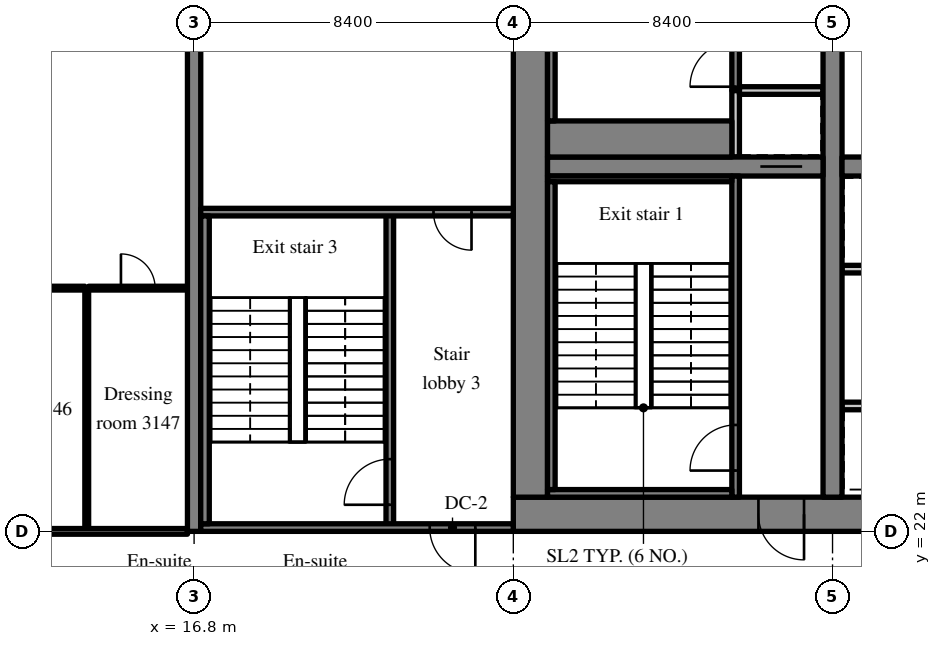
"""IFC4 building model, lengths in metres.
Left out: names, types, materials, properties, quantities, classifications, styles, units other than length and angle.
Written with IfcOpenShell. Run it as: python <this file> out.ifc"""

import sys

from ifc_helpers import new_model, si_unit, direction, frame, frame_2d, origin, place, context, subcontext, project, spatial, rectangle, extrude, source, transform, mapped, element, fill, save


model = new_model("IFC4")
c1 = context("Model", 3, precision=1e-05, world=origin(), true_north=direction((0.0, 1.0)))
c2 = subcontext(c1, "Body", "Model", "MODEL_VIEW")
j1 = project(units=[si_unit("LENGTHUNIT", "METRE"), si_unit("PLANEANGLEUNIT", "RADIAN")], contexts=[c1])
p1 = place(None, origin())
s1 = spatial("IfcSite", under=j1, at=p1, CompositionType="ELEMENT")
p2 = place(p1, origin())
s2 = spatial("IfcBuilding", under=s1, at=p2, CompositionType="ELEMENT")
p3 = place(p2, frame((0.0, 0.0, 129.4)))
s3 = spatial("IfcBuildingStorey", under=s2, at=p3, CompositionType="ELEMENT", Elevation=129.4)
m1 = source(origin(), c2, "Body", "SweptSolid", [
    extrude(rectangle(XDim=50.4, YDim=0.9, at=frame_2d((25.2, 0.0))), origin(), (0.0, 0.0, 1.0), 3.52),
])
p4 = place(p3, frame((25.2, 22.45, 0.0), z_axis=(0.0, 0.0, 1.0), x_axis=(1.0, 0.0, 0.0)))
e1 = element("IfcWall", 1, at=p4, inside=s3, PredefinedType="SHEAR", context=c2, shape_type="MappedRepresentation", body=[
    mapped(m1, transform((0.0, 0.0, 0.0), scale=1.0)),
])
m2 = source(origin(), c2, "Body", "SweptSolid", [
    extrude(rectangle(XDim=1.8, YDim=2.1, at=frame_2d((0.9, 1.05))), frame((0.0, 0.46, 0.0), z_axis=(0.0, -1.0, 0.0), x_axis=(1.0, 0.0, 0.0)), (0.0, 0.0, 1.0), 0.92),
])
p5 = place(p4, frame((15.9, 0.0, 0.0)))
e2 = element("IfcOpeningElement", 2, at=p5, cuts=e1, PredefinedType="OPENING", context=c2, shape_type="MappedRepresentation", body=[
    mapped(m2, transform((0.0, 0.0, 0.0), scale=1.0)),
])
m3 = source(origin(), c2, "Body", "SweptSolid", [
    extrude(rectangle(XDim=1.2, YDim=2.1, at=frame_2d((0.6, 1.05))), frame((0.0, 0.46, 0.0), z_axis=(0.0, -1.0, 0.0), x_axis=(1.0, 0.0, 0.0)), (0.0, 0.0, 1.0), 0.92),
])
p6 = place(p4, frame((26.975, 0.0, 0.0)))
e3 = element("IfcOpeningElement", 3, at=p6, cuts=e1, PredefinedType="OPENING", context=c2, shape_type="MappedRepresentation", body=[
    mapped(m3, transform((0.0, 0.0, 0.0), scale=1.0)),
])
m4 = source(origin(), c2, "Body", "SweptSolid", [
    extrude(rectangle(XDim=0.9, YDim=2.1, at=frame_2d((0.45, 1.05))), frame((0.0, 0.46, 0.0), z_axis=(0.0, -1.0, 0.0), x_axis=(1.0, 0.0, 0.0)), (0.0, 0.0, 1.0), 0.92),
])
p7 = place(p4, frame((33.75, 0.0, 0.0)))
e4 = element("IfcOpeningElement", 4, at=p7, cuts=e1, PredefinedType="OPENING", context=c2, shape_type="MappedRepresentation", body=[
    mapped(m4, transform((0.0, 0.0, 0.0), scale=1.0)),
])
p8 = place(p4, frame((30.75, 0.0, 0.0)))
e5 = element("IfcOpeningElement", 5, at=p8, cuts=e1, PredefinedType="OPENING", context=c2, shape_type="MappedRepresentation", body=[
    mapped(m4, transform((0.0, 0.0, 0.0), scale=1.0)),
])
p9 = place(p4, frame((38.275, 0.0, 0.0)))
e6 = element("IfcOpeningElement", 6, at=p9, cuts=e1, PredefinedType="OPENING", context=c2, shape_type="MappedRepresentation", body=[
    mapped(m4, transform((0.0, 0.0, 0.0), scale=1.0)),
])
p10 = place(p4, frame((6.45, 0.0, 0.0)))
e7 = element("IfcOpeningElement", 7, at=p10, cuts=e1, PredefinedType="OPENING", context=c2, shape_type="MappedRepresentation", body=[
    mapped(m3, transform((0.0, 0.0, 0.0), scale=1.0)),
])
p11 = place(p4, frame((47.775, 0.0, 0.0)))
e8 = element("IfcOpeningElement", 8, at=p11, cuts=e1, PredefinedType="OPENING", context=c2, shape_type="MappedRepresentation", body=[
    mapped(m3, transform((0.0, 0.0, 0.0), scale=1.0)),
])
m5 = source(origin(), c2, "Body", "SweptSolid", [
    extrude(rectangle(XDim=18.2, YDim=0.9, at=frame_2d((9.1, 0.0))), origin(), (0.0, 0.0, 1.0), 3.52),
])
p12 = place(p3, frame((25.65, 22.9, 0.0), z_axis=(0.0, 0.0, 1.0), x_axis=(0.0, 1.0, 0.0)))
e9 = element("IfcWall", 9, at=p12, inside=s3, PredefinedType="SHEAR", context=c2, shape_type="MappedRepresentation", body=[
    mapped(m5, transform((0.0, 0.0, 0.0), scale=1.0)),
])
m6 = source(origin(), c2, "Body", "SweptSolid", [
    extrude(rectangle(XDim=18.2, YDim=0.5, at=frame_2d((9.1, 0.0))), origin(), (0.0, 0.0, 1.0), 3.52),
])
p13 = place(p3, frame((33.6, 22.9, 0.0), z_axis=(0.0, 0.0, 1.0), x_axis=(0.0, 1.0, 0.0)))
e10 = element("IfcWall", 10, at=p13, inside=s3, PredefinedType="SHEAR", context=c2, shape_type="MappedRepresentation", body=[
    mapped(m6, transform((0.0, 0.0, 0.0), scale=1.0)),
])
m7 = source(origin(), c2, "Body", "SweptSolid", [
    extrude(rectangle(XDim=1.1, YDim=2.1, at=frame_2d((0.55, 1.05))), frame((0.0, 0.26, 0.0), z_axis=(0.0, -1.0, 0.0), x_axis=(1.0, 0.0, 0.0)), (0.0, 0.0, 1.0), 0.52),
])
p14 = place(p13, frame((12.55, 0.0, 0.0)))
e11 = element("IfcOpeningElement", 11, at=p14, cuts=e10, PredefinedType="OPENING", context=c2, shape_type="MappedRepresentation", body=[
    mapped(m7, transform((0.0, 0.0, 0.0), scale=1.0)),
])
m8 = source(origin(), c2, "Body", "SweptSolid", [
    extrude(rectangle(XDim=7.25, YDim=0.5, at=frame_2d((3.625, 0.0))), origin(), (0.0, 0.0, 1.0), 3.52),
])
p15 = place(p3, frame((26.1, 31.6, 0.0), z_axis=(0.0, 0.0, 1.0), x_axis=(1.0, 0.0, 0.0)))
e12 = element("IfcWall", 12, at=p15, inside=s3, PredefinedType="SHEAR", context=c2, shape_type="MappedRepresentation", body=[
    mapped(m8, transform((0.0, 0.0, 0.0), scale=1.0)),
])
p16 = place(p15, frame((5.6, 0.0, 0.0)))
e13 = element("IfcOpeningElement", 13, at=p16, cuts=e12, PredefinedType="OPENING", context=c2, shape_type="MappedRepresentation", body=[
    mapped(m7, transform((0.0, 0.0, 0.0), scale=1.0)),
])
m9 = source(origin(), c2, "Body", "SweptSolid", [
    extrude(rectangle(XDim=16.3, YDim=0.5, at=frame_2d((8.15, 0.0))), origin(), (0.0, 0.0, 1.0), 3.52),
])
p17 = place(p3, frame((33.85, 31.6, 0.0), z_axis=(0.0, 0.0, 1.0), x_axis=(1.0, 0.0, 0.0)))
e14 = element("IfcWall", 14, at=p17, inside=s3, PredefinedType="SHEAR", context=c2, shape_type="MappedRepresentation", body=[
    mapped(m9, transform((0.0, 0.0, 0.0), scale=1.0)),
])
m10 = source(origin(), c2, "Body", "SweptSolid", [
    extrude(rectangle(XDim=1.0, YDim=2.1, at=frame_2d((0.5, 1.05))), frame((0.0, 0.26, 0.0), z_axis=(0.0, -1.0, 0.0), x_axis=(1.0, 0.0, 0.0)), (0.0, 0.0, 1.0), 0.52),
])
p18 = place(p17, frame((14.725, 0.0, 0.0)))
e15 = element("IfcOpeningElement", 15, at=p18, cuts=e14, PredefinedType="OPENING", context=c2, shape_type="MappedRepresentation", body=[
    mapped(m10, transform((0.0, 0.0, 0.0), scale=1.0)),
])
m11 = source(origin(), c2, "Body", "SweptSolid", [
    extrude(rectangle(XDim=20.0, YDim=0.35, at=frame_2d((10.0, 0.0))), origin(), (0.0, 0.0, 1.0), 3.52),
])
p19 = place(p3, frame((16.8, 22.0, 0.0), z_axis=(0.0, 0.0, 1.0), x_axis=(0.0, 1.0, 0.0)))
e16 = element("IfcWall", 16, at=p19, inside=s3, PredefinedType="SHEAR", context=c2, shape_type="MappedRepresentation", body=[
    mapped(m11, transform((0.0, 0.0, 0.0), scale=1.0)),
])
m12 = source(origin(), c2, "Body", "SweptSolid", [
    extrude(rectangle(XDim=6.05, YDim=0.2, at=frame_2d((3.025, 0.0))), origin(), (0.0, 0.0, 1.0), 3.52),
])
p20 = place(p3, frame((33.85, 25.3, 0.0), z_axis=(0.0, 0.0, 1.0), x_axis=(1.0, 0.0, 0.0)))
e17 = element("IfcWall", 17, at=p20, inside=s3, PredefinedType="SOLIDWALL", context=c2, shape_type="MappedRepresentation", body=[
    mapped(m12, transform((0.0, 0.0, 0.0), scale=1.0)),
])
m13 = source(origin(), c2, "Body", "SweptSolid", [
    extrude(rectangle(XDim=1.1, YDim=2.1, at=frame_2d((0.55, 1.05))), frame((0.0, 0.11, 0.0), z_axis=(0.0, -1.0, 0.0), x_axis=(1.0, 0.0, 0.0)), (0.0, 0.0, 1.0), 0.22),
])
p21 = place(p20, frame((1.0, 0.0, 0.0)))
e18 = element("IfcOpeningElement", 18, at=p21, cuts=e17, PredefinedType="OPENING", context=c2, shape_type="MappedRepresentation", body=[
    mapped(m13, transform((0.0, 0.0, 0.0), scale=1.0)),
])
p22 = place(p20, frame((4.0, 0.0, 0.0)))
e19 = element("IfcOpeningElement", 19, at=p22, cuts=e17, PredefinedType="OPENING", context=c2, shape_type="MappedRepresentation", body=[
    mapped(m13, transform((0.0, 0.0, 0.0), scale=1.0)),
])
m14 = source(origin(), c2, "Body", "SweptSolid", [
    extrude(rectangle(XDim=12.05, YDim=0.2, at=frame_2d((6.025, 0.0))), origin(), (0.0, 0.0, 1.0), 3.52),
])
p23 = place(p3, frame((33.85, 28.9, 0.0), z_axis=(0.0, 0.0, 1.0), x_axis=(1.0, 0.0, 0.0)))
e20 = element("IfcWall", 20, at=p23, inside=s3, PredefinedType="SOLIDWALL", context=c2, shape_type="MappedRepresentation", body=[
    mapped(m14, transform((0.0, 0.0, 0.0), scale=1.0)),
])
p24 = place(p23, frame((1.0, 0.0, 0.0)))
e21 = element("IfcOpeningElement", 21, at=p24, cuts=e20, PredefinedType="OPENING", context=c2, shape_type="MappedRepresentation", body=[
    mapped(m13, transform((0.0, 0.0, 0.0), scale=1.0)),
])
p25 = place(p23, frame((4.0, 0.0, 0.0)))
e22 = element("IfcOpeningElement", 22, at=p25, cuts=e20, PredefinedType="OPENING", context=c2, shape_type="MappedRepresentation", body=[
    mapped(m13, transform((0.0, 0.0, 0.0), scale=1.0)),
])
p26 = place(p23, frame((7.0, 0.0, 0.0)))
e23 = element("IfcOpeningElement", 23, at=p26, cuts=e20, PredefinedType="OPENING", context=c2, shape_type="MappedRepresentation", body=[
    mapped(m13, transform((0.0, 0.0, 0.0), scale=1.0)),
])
p27 = place(p23, frame((10.0, 0.0, 0.0)))
e24 = element("IfcOpeningElement", 24, at=p27, cuts=e20, PredefinedType="OPENING", context=c2, shape_type="MappedRepresentation", body=[
    mapped(m13, transform((0.0, 0.0, 0.0), scale=1.0)),
])
m15 = source(origin(), c2, "Body", "SweptSolid", [
    extrude(rectangle(XDim=8.45, YDim=0.2, at=frame_2d((4.225, 0.0))), origin(), (0.0, 0.0, 1.0), 3.52),
])
p28 = place(p3, frame((31.05, 22.9, 0.0), z_axis=(0.0, 0.0, 1.0), x_axis=(0.0, 1.0, 0.0)))
e25 = element("IfcWall", 25, at=p28, inside=s3, PredefinedType="SOLIDWALL", context=c2, shape_type="MappedRepresentation", body=[
    mapped(m15, transform((0.0, 0.0, 0.0), scale=1.0)),
])
m16 = source(origin(), c2, "Body", "SweptSolid", [
    extrude(rectangle(XDim=1.2, YDim=2.1, at=frame_2d((0.6, 1.05))), frame((0.0, 0.11, 0.0), z_axis=(0.0, -1.0, 0.0), x_axis=(1.0, 0.0, 0.0)), (0.0, 0.0, 1.0), 0.22),
])
p29 = place(p28, frame((0.7, 0.0, 0.0)))
e26 = element("IfcOpeningElement", 26, at=p29, cuts=e25, PredefinedType="OPENING", context=c2, shape_type="MappedRepresentation", body=[
    mapped(m16, transform((0.0, 0.0, 0.0), scale=1.0)),
])
m17 = source(origin(), c2, "Body", "SweptSolid", [
    extrude(rectangle(XDim=1.75, YDim=0.2, at=frame_2d((0.875, 0.0))), origin(), (0.0, 0.0, 1.0), 3.52),
])
p30 = place(p3, frame((31.05, 31.85, 0.0), z_axis=(0.0, 0.0, 1.0), x_axis=(0.0, 1.0, 0.0)))
e27 = element("IfcWall", 27, at=p30, inside=s3, PredefinedType="SOLIDWALL", context=c2, shape_type="MappedRepresentation", body=[
    mapped(m17, transform((0.0, 0.0, 0.0), scale=1.0)),
])
m18 = source(origin(), c2, "Body", "SweptSolid", [
    extrude(rectangle(XDim=2.2, YDim=0.2, at=frame_2d((1.1, 0.0))), origin(), (0.0, 0.0, 1.0), 3.52),
])
p31 = place(p3, frame((31.15, 33.6, 0.0), z_axis=(0.0, 0.0, 1.0), x_axis=(1.0, 0.0, 0.0)))
e28 = element("IfcWall", 28, at=p31, inside=s3, PredefinedType="SOLIDWALL", context=c2, shape_type="MappedRepresentation", body=[
    mapped(m18, transform((0.0, 0.0, 0.0), scale=1.0)),
])
m19 = source(origin(), c2, "Body", "SweptSolid", [
    extrude(rectangle(XDim=7.5, YDim=0.2, at=frame_2d((3.75, 0.0))), origin(), (0.0, 0.0, 1.0), 3.52),
])
p32 = place(p3, frame((31.05, 33.6, 0.0), z_axis=(0.0, 0.0, 1.0), x_axis=(0.0, 1.0, 0.0)))
e29 = element("IfcWall", 29, at=p32, inside=s3, PredefinedType="SOLIDWALL", context=c2, shape_type="MappedRepresentation", body=[
    mapped(m19, transform((0.0, 0.0, 0.0), scale=1.0)),
])
p33 = place(p32, frame((0.1, 0.0, 0.0)))
e30 = element("IfcOpeningElement", 30, at=p33, cuts=e29, PredefinedType="OPENING", context=c2, shape_type="MappedRepresentation", body=[
    mapped(m16, transform((0.0, 0.0, 0.0), scale=1.0)),
])
m20 = source(origin(), c2, "Body", "SweptSolid", [
    extrude(rectangle(XDim=8.3, YDim=0.2, at=frame_2d((4.15, 0.0))), origin(), (0.0, 0.0, 1.0), 3.52),
])
p34 = place(p3, frame((21.95, 22.1, 0.0), z_axis=(0.0, 0.0, 1.0), x_axis=(0.0, 1.0, 0.0)))
e31 = element("IfcWall", 31, at=p34, inside=s3, PredefinedType="SOLIDWALL", context=c2, shape_type="MappedRepresentation", body=[
    mapped(m20, transform((0.0, 0.0, 0.0), scale=1.0)),
])
p35 = place(p34, frame((0.6, 0.0, 0.0)))
e32 = element("IfcOpeningElement", 32, at=p35, cuts=e31, PredefinedType="OPENING", context=c2, shape_type="MappedRepresentation", body=[
    mapped(m16, transform((0.0, 0.0, 0.0), scale=1.0)),
])
m21 = source(origin(), c2, "Body", "SweptSolid", [
    extrude(rectangle(XDim=8.225, YDim=0.2, at=frame_2d((4.112, 0.0))), origin(), (0.0, 0.0, 1.0), 3.52),
])
p36 = place(p3, frame((16.975, 22.1, 0.0), z_axis=(0.0, 0.0, 1.0), x_axis=(1.0, 0.0, 0.0)))
e33 = element("IfcWall", 33, at=p36, inside=s3, PredefinedType="SOLIDWALL", context=c2, shape_type="MappedRepresentation", body=[
    mapped(m21, transform((0.0, 0.0, 0.0), scale=1.0)),
])
p37 = place(p36, frame((6.025, 0.0, 0.0)))
e34 = element("IfcOpeningElement", 34, at=p37, cuts=e33, PredefinedType="OPENING", context=c2, shape_type="MappedRepresentation", body=[
    mapped(m16, transform((0.0, 0.0, 0.0), scale=1.0)),
])
p38 = place(p3, frame((16.975, 30.4, 0.0), z_axis=(0.0, 0.0, 1.0), x_axis=(1.0, 0.0, 0.0)))
e35 = element("IfcWall", 35, at=p38, inside=s3, PredefinedType="SOLIDWALL", context=c2, shape_type="MappedRepresentation", body=[
    mapped(m21, transform((0.0, 0.0, 0.0), scale=1.0)),
])
m22 = source(origin(), c2, "Body", "SweptSolid", [
    extrude(rectangle(XDim=1.0, YDim=2.1, at=frame_2d((0.5, 1.05))), frame((0.0, 0.11, 0.0), z_axis=(0.0, -1.0, 0.0), x_axis=(1.0, 0.0, 0.0)), (0.0, 0.0, 1.0), 0.22),
])
p39 = place(p38, frame((6.125, 0.0, 0.0)))
e36 = element("IfcOpeningElement", 36, at=p39, cuts=e35, PredefinedType="OPENING", context=c2, shape_type="MappedRepresentation", body=[
    mapped(m22, transform((0.0, 0.0, 0.0), scale=1.0)),
])
m23 = source(origin(), c2, "Body", "SweptSolid", [
    extrude(rectangle(XDim=4.85, YDim=0.2, at=frame_2d((2.425, 0.0))), origin(), (0.0, 0.0, 1.0), 3.52),
])
p40 = place(p3, frame((26.1, 23.0, 0.0), z_axis=(0.0, 0.0, 1.0), x_axis=(1.0, 0.0, 0.0)))
e37 = element("IfcWall", 37, at=p40, inside=s3, PredefinedType="SOLIDWALL", context=c2, shape_type="MappedRepresentation", body=[
    mapped(m23, transform((0.0, 0.0, 0.0), scale=1.0)),
])
m24 = source(origin(), c2, "Body", "SweptSolid", [
    extrude(rectangle(XDim=4.85, YDim=0.15, at=frame_2d((2.425, 0.0))), origin(), (0.0, 0.0, 1.0), 3.52),
])
p41 = place(p3, frame((26.1, 31.275, 0.0), z_axis=(0.0, 0.0, 1.0), x_axis=(1.0, 0.0, 0.0)))
e38 = element("IfcWall", 38, at=p41, inside=s3, PredefinedType="SOLIDWALL", context=c2, shape_type="MappedRepresentation", body=[
    mapped(m24, transform((0.0, 0.0, 0.0), scale=1.0)),
])
m25 = source(origin(), c2, "Body", "SweptSolid", [
    extrude(rectangle(XDim=8.1, YDim=0.2, at=frame_2d((4.05, 0.0))), origin(), (0.0, 0.0, 1.0), 3.52),
])
p42 = place(p3, frame((26.2, 23.1, 0.0), z_axis=(0.0, 0.0, 1.0), x_axis=(0.0, 1.0, 0.0)))
e39 = element("IfcWall", 39, at=p42, inside=s3, PredefinedType="SOLIDWALL", context=c2, shape_type="MappedRepresentation", body=[
    mapped(m25, transform((0.0, 0.0, 0.0), scale=1.0)),
])
m26 = source(origin(), c2, "Body", "SweptSolid", [
    extrude(rectangle(XDim=8.1, YDim=0.225, at=frame_2d((4.05, 0.0))), origin(), (0.0, 0.0, 1.0), 3.52),
])
p43 = place(p3, frame((17.087, 22.2, 0.0), z_axis=(0.0, 0.0, 1.0), x_axis=(0.0, 1.0, 0.0)))
e40 = element("IfcWall", 40, at=p43, inside=s3, PredefinedType="SOLIDWALL", context=c2, shape_type="MappedRepresentation", body=[
    mapped(m26, transform((0.0, 0.0, 0.0), scale=1.0)),
])
m27 = source(origin(), c2, "Body", "SweptSolid", [
    extrude(rectangle(XDim=4.85, YDim=0.95, at=frame_2d((2.425, 0.0))), origin(), (0.0, 0.0, 1.0), 3.52),
])
p44 = place(p3, frame((26.1, 32.325, 0.0), z_axis=(0.0, 0.0, 1.0), x_axis=(1.0, 0.0, 0.0)))
e41 = element("IfcWall", 41, at=p44, inside=s3, PredefinedType="SOLIDWALL", context=c2, shape_type="MappedRepresentation", body=[
    mapped(m27, transform((0.0, 0.0, 0.0), scale=1.0)),
])
p45 = place(p3, frame((26.2, 32.8, 0.0), z_axis=(0.0, 0.0, 1.0), x_axis=(0.0, 1.0, 0.0)))
e42 = element("IfcWall", 42, at=p45, inside=s3, PredefinedType="SOLIDWALL", context=c2, shape_type="MappedRepresentation", body=[
    mapped(m25, transform((0.0, 0.0, 0.0), scale=1.0)),
])
m28 = source(origin(), c2, "Body", "SweptSolid", [
    extrude(rectangle(XDim=6.25, YDim=0.1, at=frame_2d((3.125, 0.0))), origin(), (0.0, 0.0, 1.0), 3.52),
])
p46 = place(p3, frame((13.975, 22.075, 0.0), z_axis=(0.0, 0.0, 1.0), x_axis=(0.0, 1.0, 0.0)))
e43 = element("IfcWall", 43, at=p46, inside=s3, PredefinedType="PARTITIONING", context=c2, shape_type="MappedRepresentation", body=[
    mapped(m28, transform((0.0, 0.0, 0.0), scale=1.0)),
])
m29 = source(origin(), c2, "Body", "SweptSolid", [
    extrude(rectangle(XDim=3.5, YDim=0.1, at=frame_2d((1.75, 0.0))), origin(), (0.0, 0.0, 1.0), 3.52),
])
p47 = place(p3, frame((10.425, 28.4, 0.0), z_axis=(0.0, 0.0, 1.0), x_axis=(1.0, 0.0, 0.0)))
e44 = element("IfcWall", 44, at=p47, inside=s3, PredefinedType="PARTITIONING", context=c2, shape_type="MappedRepresentation", body=[
    mapped(m29, transform((0.0, 0.0, 0.0), scale=1.0)),
])
m30 = source(origin(), c2, "Body", "SweptSolid", [
    extrude(rectangle(XDim=0.9, YDim=2.1, at=frame_2d((0.45, 1.05))), frame((0.0, 0.06, 0.0), z_axis=(0.0, -1.0, 0.0), x_axis=(1.0, 0.0, 0.0)), (0.0, 0.0, 1.0), 0.12),
])
p48 = place(p47, frame((1.3, 0.0, 0.0)))
e45 = element("IfcOpeningElement", 45, at=p48, cuts=e44, PredefinedType="OPENING", context=c2, shape_type="MappedRepresentation", body=[
    mapped(m30, transform((0.0, 0.0, 0.0), scale=1.0)),
])
m31 = source(origin(), c2, "Body", "SweptSolid", [
    extrude(rectangle(XDim=2.6, YDim=0.1, at=frame_2d((1.3, 0.0))), origin(), (0.0, 0.0, 1.0), 3.52),
])
p49 = place(p3, frame((14.025, 28.4, 0.0), z_axis=(0.0, 0.0, 1.0), x_axis=(1.0, 0.0, 0.0)))
e46 = element("IfcWall", 46, at=p49, inside=s3, PredefinedType="PARTITIONING", context=c2, shape_type="MappedRepresentation", body=[
    mapped(m31, transform((0.0, 0.0, 0.0), scale=1.0)),
])
p50 = place(p49, frame((0.85, 0.0, 0.0)))
e47 = element("IfcOpeningElement", 47, at=p50, cuts=e46, PredefinedType="OPENING", context=c2, shape_type="MappedRepresentation", body=[
    mapped(m30, transform((0.0, 0.0, 0.0), scale=1.0)),
])
m32 = source(origin(), c2, "Body", "SweptSolid", [
    extrude(rectangle(XDim=8.05, YDim=0.15, at=frame_2d((4.025, 0.0))), origin(), (0.0, 0.0, 1.0), 2.82),
])
p51 = place(p3, frame((8.575, 22.0, 0.0), z_axis=(0.0, 0.0, 1.0), x_axis=(1.0, 0.0, 0.0)))
e48 = element("IfcWall", 48, at=p51, inside=s3, PredefinedType="PARTITIONING", context=c2, shape_type="MappedRepresentation", body=[
    mapped(m32, transform((0.0, 0.0, 0.0), scale=1.0)),
])
m33 = source(origin(), c2, "Body", "SweptSolid", [
    extrude(rectangle(XDim=1.0, YDim=2.1, at=frame_2d((0.5, 1.05))), frame((0.0, 0.085, 0.0), z_axis=(0.0, -1.0, 0.0), x_axis=(1.0, 0.0, 0.0)), (0.0, 0.0, 1.0), 0.17),
])
p52 = place(p51, frame((0.4, 0.0, 0.0)))
e49 = element("IfcOpeningElement", 49, at=p52, cuts=e48, PredefinedType="OPENING", context=c2, shape_type="MappedRepresentation", body=[
    mapped(m33, transform((0.0, 0.0, 0.0), scale=1.0)),
])
m34 = source(origin(), c2, "Body", "SweptSolid", [
    extrude(rectangle(XDim=1.2, YDim=2.1, at=frame_2d((0.6, 1.05))), frame((0.0, 0.025, 0.0), z_axis=(0.0, -1.0, 0.0), x_axis=(1.0, 0.0, 0.0)), (0.0, 0.0, 1.0), 0.05),
])
p53 = place(p29, origin())
e50 = element("IfcDoor", 50, at=p53, inside=s3, OperationType="SINGLE_SWING_LEFT", PredefinedType="DOOR", context=c2, shape_type="MappedRepresentation", body=[
    mapped(m34, transform((0.0, 0.0, 0.0), scale=1.0)),
])
fill(e26, e50)
m35 = source(origin(), c2, "Body", "SweptSolid", [
    extrude(rectangle(XDim=1.2, YDim=2.1, at=frame_2d((0.6, 1.05))), frame((0.0, 0.375, 0.0), z_axis=(0.0, -1.0, 0.0), x_axis=(1.0, 0.0, 0.0)), (0.0, 0.0, 1.0), 0.05),
])
p54 = place(p10, origin())
e51 = element("IfcDoor", 51, at=p54, inside=s3, OperationType="SINGLE_SWING_RIGHT", PredefinedType="DOOR", context=c2, shape_type="MappedRepresentation", body=[
    mapped(m35, transform((0.0, 0.0, 0.0), scale=1.0)),
])
fill(e7, e51)
m36 = source(origin(), c2, "Body", "SweptSolid", [
    extrude(rectangle(XDim=1.1, YDim=2.1, at=frame_2d((0.55, 1.05))), frame((0.0, 0.025, 0.0), z_axis=(0.0, -1.0, 0.0), x_axis=(1.0, 0.0, 0.0)), (0.0, 0.0, 1.0), 0.05),
])
p55 = place(p16, origin())
e52 = element("IfcDoor", 52, at=p55, inside=s3, OperationType="SLIDING_TO_LEFT", PredefinedType="DOOR", context=c2, shape_type="MappedRepresentation", body=[
    mapped(m36, transform((0.0, 0.0, 0.0), scale=1.0)),
])
fill(e13, e52)
p56 = place(p33, origin())
e53 = element("IfcDoor", 53, at=p56, inside=s3, OperationType="SINGLE_SWING_LEFT", PredefinedType="DOOR", context=c2, shape_type="MappedRepresentation", body=[
    mapped(m34, transform((0.0, 0.0, 0.0), scale=1.0)),
])
fill(e30, e53)
p57 = place(p35, origin())
e54 = element("IfcDoor", 54, at=p57, inside=s3, OperationType="SINGLE_SWING_LEFT", PredefinedType="DOOR", context=c2, shape_type="MappedRepresentation", body=[
    mapped(m34, transform((0.0, 0.0, 0.0), scale=1.0)),
])
fill(e32, e54)
p58 = place(p37, origin())
e55 = element("IfcDoor", 55, at=p58, inside=s3, OperationType="SINGLE_SWING_RIGHT", PredefinedType="DOOR", context=c2, shape_type="MappedRepresentation", body=[
    mapped(m34, transform((0.0, 0.0, 0.0), scale=1.0)),
])
fill(e34, e55)
m37 = source(origin(), c2, "Body", "SweptSolid", [
    extrude(rectangle(XDim=1.0, YDim=2.1, at=frame_2d((0.5, 1.05))), frame((0.0, 0.025, 0.0), z_axis=(0.0, -1.0, 0.0), x_axis=(1.0, 0.0, 0.0)), (0.0, 0.0, 1.0), 0.05),
])
p59 = place(p39, origin())
e56 = element("IfcDoor", 56, at=p59, inside=s3, OperationType="SINGLE_SWING_RIGHT", PredefinedType="DOOR", context=c2, shape_type="MappedRepresentation", body=[
    mapped(m37, transform((0.0, 0.0, 0.0), scale=1.0)),
])
fill(e36, e56)
m38 = source(origin(), c2, "Body", "SweptSolid", [
    extrude(rectangle(XDim=0.9, YDim=2.1, at=frame_2d((0.45, 1.05))), frame((0.0, 0.025, 0.0), z_axis=(0.0, -1.0, 0.0), x_axis=(1.0, 0.0, 0.0)), (0.0, 0.0, 1.0), 0.05),
])
p60 = place(p50, origin())
e57 = element("IfcDoor", 57, at=p60, inside=s3, OperationType="SINGLE_SWING_LEFT", PredefinedType="DOOR", context=c2, shape_type="MappedRepresentation", body=[
    mapped(m38, transform((0.0, 0.0, 0.0), scale=1.0)),
])
fill(e47, e57)
save(model, sys.argv[1])
